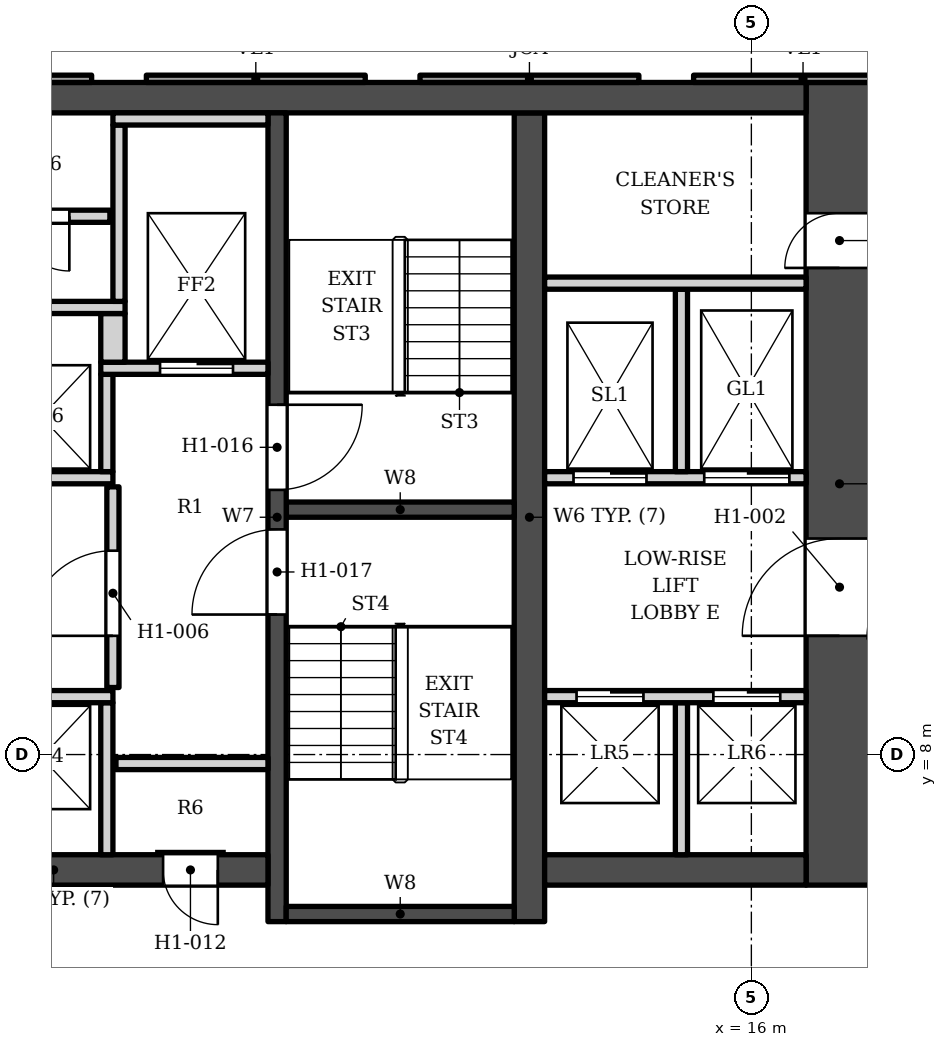
"""IFC4 building model, lengths in metres.
Left out: names, types, materials, properties, quantities, classifications, styles, units other than length and angle.
Written with IfcOpenShell. Run it as: python <this file> out.ifc"""

import sys

from ifc_helpers import new_model, si_unit, direction, frame, frame_2d, origin, place, context, subcontext, project, spatial, polyline, rectangle, outline, extrude, element, fill, save


model = new_model("IFC4")
c1 = context("Model", 3, precision=1e-05, world=origin(), true_north=direction((0.0, 1.0)))
c2 = subcontext(c1, "Body", "Model", "MODEL_VIEW")
j1 = project(units=[si_unit("LENGTHUNIT", "METRE"), si_unit("PLANEANGLEUNIT", "RADIAN")], contexts=[c1])
p1 = place(None, origin())
s1 = spatial("IfcSite", under=j1, at=p1, CompositionType="ELEMENT")
p2 = place(p1, origin())
s2 = spatial("IfcBuilding", under=s1, at=p2, CompositionType="ELEMENT")
p3 = place(p2, frame((0.0, 0.0, 46.0)))
s3 = spatial("IfcBuildingStorey", under=s2, at=p3, CompositionType="ELEMENT", Elevation=46.0)
p4 = place(p3, frame((-16.9, 18.802, 0.0), z_axis=(0.0, 0.0, 1.0), x_axis=(1.0, 0.0, 0.0)))
e1 = element("IfcWall", 1, at=p4, inside=s3, PredefinedType="SHEAR", context=c2, shape_type="SweptSolid", body=[
    extrude(rectangle(XDim=33.8, YDim=0.5, at=frame_2d((16.9, 0.0))), origin(), (0.0, 0.0, 1.0), 3.4),
])
p5 = place(p3, frame((12.35, 5.253, 0.0), z_axis=(0.0, 0.0, 1.0), x_axis=(0.0, 1.0, 0.0)))
e2 = element("IfcWall", 2, at=p5, inside=s3, PredefinedType="SHEAR", context=c2, shape_type="SweptSolid", body=[
    extrude(rectangle(XDim=13.3, YDim=0.5, at=frame_2d((6.65, 0.0))), origin(), (0.0, 0.0, 1.0), 3.4),
])
p6 = place(p3, frame((8.2, 5.253, 0.0), z_axis=(0.0, 0.0, 1.0), x_axis=(0.0, 1.0, 0.0)))
e3 = element("IfcWall", 3, at=p6, inside=s3, PredefinedType="SHEAR", context=c2, shape_type="SweptSolid", body=[
    extrude(rectangle(XDim=13.3, YDim=0.3, at=frame_2d((6.65, 0.0))), origin(), (0.0, 0.0, 1.0), 3.4),
])
p7 = place(p6, frame((7.1, 0.0, 0.0)))
e4 = element("IfcOpeningElement", 4, at=p7, cuts=e3, PredefinedType="OPENING", context=c2, shape_type="SweptSolid", body=[
    extrude(rectangle(XDim=1.4, YDim=2.1, at=frame_2d((0.7, 1.05))), frame((0.0, 0.16, 0.0), z_axis=(0.0, -1.0, 0.0), x_axis=(1.0, 0.0, 0.0)), (0.0, 0.0, 1.0), 0.32),
])
p8 = place(p6, frame((5.05, 0.0, 0.0)))
e5 = element("IfcOpeningElement", 5, at=p8, cuts=e3, PredefinedType="OPENING", context=c2, shape_type="SweptSolid", body=[
    extrude(rectangle(XDim=1.4, YDim=2.1, at=frame_2d((0.7, 1.05))), frame((0.0, 0.16, 0.0), z_axis=(0.0, -1.0, 0.0), x_axis=(1.0, 0.0, 0.0)), (0.0, 0.0, 1.0), 0.32),
])
for number, where, z_axis, x_axis in (
    (6, (8.35, 12.028, 0.0), (0.0, 0.0, 1.0), (1.0, 0.0, 0.0)),
    (7, (8.35, 5.378, 0.0), (0.0, 0.0, 1.0), (1.0, 0.0, 0.0)),
):
    element("IfcWall", number, at=place(p3, frame(where, z_axis=z_axis, x_axis=x_axis)), inside=s3, PredefinedType="SHEAR", context=c2, shape_type="SweptSolid", body=[
        extrude(rectangle(XDim=3.75, YDim=0.25, at=frame_2d((1.875, 0.0))), origin(), (0.0, 0.0, 1.0), 3.4),
    ])
p9 = place(p3, frame((1.0, 6.103, 0.0), z_axis=(0.0, 0.0, 1.0), x_axis=(1.0, 0.0, 0.0)))
e8 = element("IfcWall", 8, at=p9, inside=s3, PredefinedType="SHEAR", context=c2, shape_type="SweptSolid", body=[
    extrude(rectangle(XDim=7.05, YDim=0.5, at=frame_2d((3.525, 0.0))), origin(), (0.0, 0.0, 1.0), 3.4),
])
p10 = place(p9, frame((5.325, 0.0, 0.0)))
e9 = element("IfcOpeningElement", 9, at=p10, cuts=e8, PredefinedType="OPENING", context=c2, shape_type="SweptSolid", body=[
    extrude(rectangle(XDim=0.9, YDim=2.1, at=frame_2d((0.45, 1.05))), frame((0.0, 0.26, 0.0), z_axis=(0.0, -1.0, 0.0), x_axis=(1.0, 0.0, 0.0)), (0.0, 0.0, 1.0), 0.52),
])
p11 = place(p3, frame((12.6, 6.103, 0.0), z_axis=(0.0, 0.0, 1.0), x_axis=(1.0, 0.0, 0.0)))
e10 = element("IfcWall", 10, at=p11, inside=s3, PredefinedType="SHEAR", context=c2, shape_type="SweptSolid", body=[
    extrude(rectangle(XDim=4.3, YDim=0.5, at=frame_2d((2.15, 0.0))), origin(), (0.0, 0.0, 1.0), 3.4),
])
p12 = place(p3, frame((17.45, 5.853, 0.0), z_axis=(0.0, 0.0, 1.0), x_axis=(0.0, 1.0, 0.0)))
e11 = element("IfcWall", 11, at=p12, inside=s3, PredefinedType="SHEAR", context=c2, shape_type="SweptSolid", body=[
    extrude(rectangle(XDim=13.2, YDim=1.1, at=frame_2d((6.6, 0.0))), origin(), (0.0, 0.0, 1.0), 3.4),
])
p13 = place(p12, frame((4.1, 0.0, 0.0)))
e12 = element("IfcOpeningElement", 12, at=p13, cuts=e11, PredefinedType="OPENING", context=c2, shape_type="SweptSolid", body=[
    extrude(rectangle(XDim=1.6, YDim=2.1, at=frame_2d((0.8, 1.05))), frame((0.0, 0.56, 0.0), z_axis=(0.0, -1.0, 0.0), x_axis=(1.0, 0.0, 0.0)), (0.0, 0.0, 1.0), 1.12),
])
p14 = place(p12, frame((10.15, 0.0, 0.0)))
e13 = element("IfcOpeningElement", 13, at=p14, cuts=e11, PredefinedType="OPENING", context=c2, shape_type="SweptSolid", body=[
    extrude(rectangle(XDim=0.9, YDim=2.1, at=frame_2d((0.45, 1.05))), frame((0.0, 0.56, 0.0), z_axis=(0.0, -1.0, 0.0), x_axis=(1.0, 0.0, 0.0)), (0.0, 0.0, 1.0), 1.12),
])
p15 = place(p3, origin())
e14 = element("IfcWall", 14, at=p15, inside=s3, PredefinedType="ELEMENTEDWALL", context=c2, shape_type="SweptSolid", body=[
    extrude(outline(polyline([(15.05, 19.173), (15.05, 19.052), (18.649, 19.052), (18.649, 19.173), (15.05, 19.173)])), origin(), (0.0, 0.0, 1.0), 2.65),
])
p16 = place(p3, origin())
e15 = element("IfcWall", 15, at=p16, inside=s3, PredefinedType="SOLIDWALL", context=c2, shape_type="SweptSolid", body=[
    extrude(outline(polyline([(10.55, 19.173), (10.55, 19.052), (14.15, 19.052), (14.15, 19.173), (10.55, 19.173)])), origin(), (0.0, 0.0, 1.0), 2.65),
])
p17 = place(p3, origin())
e16 = element("IfcWall", 16, at=p17, inside=s3, PredefinedType="ELEMENTEDWALL", context=c2, shape_type="SweptSolid", body=[
    extrude(outline(polyline([(6.05, 19.173), (6.05, 19.052), (9.65, 19.052), (9.65, 19.173), (6.05, 19.173)])), origin(), (0.0, 0.0, 1.0), 2.65),
])
p18 = place(p3, origin())
e17 = element("IfcWall", 17, at=p18, inside=s3, PredefinedType="SOLIDWALL", context=c2, shape_type="SweptSolid", body=[
    extrude(outline(polyline([(1.55, 19.173), (1.55, 19.052), (5.15, 19.052), (5.15, 19.173), (1.55, 19.173)])), origin(), (0.0, 0.0, 1.0), 2.65),
])
for number, where, z_axis, x_axis in (
    (18, (5.4, 6.353, 0.0), (0.0, 0.0, 1.0), (0.0, 1.0, 0.0)),
    (19, (14.85, 6.353, 0.0), (0.0, 0.0, 1.0), (0.0, 1.0, 0.0)),
    (20, (5.55, 7.853, 0.0), (0.0, 0.0, 1.0), (1.0, 0.0, 0.0)),
):
    element("IfcWall", number, at=place(p3, frame(where, z_axis=z_axis, x_axis=x_axis)), inside=s3, PredefinedType="SOLIDWALL", context=c2, shape_type="SweptSolid", body=[
        extrude(rectangle(XDim=2.5, YDim=0.2, at=frame_2d((1.25, 0.0))), origin(), (0.0, 0.0, 1.0), 3.23),
    ])
p19 = place(p3, frame((1.0, 8.953, 0.0), z_axis=(0.0, 0.0, 1.0), x_axis=(1.0, 0.0, 0.0)))
e21 = element("IfcWall", 21, at=p19, inside=s3, PredefinedType="SOLIDWALL", context=c2, shape_type="SweptSolid", body=[
    extrude(rectangle(XDim=4.5, YDim=0.2, at=frame_2d((2.25, 0.0))), origin(), (0.0, 0.0, 1.0), 3.23),
])
p20 = place(p3, frame((12.6, 8.953, 0.0), z_axis=(0.0, 0.0, 1.0), x_axis=(1.0, 0.0, 0.0)))
e22 = element("IfcWall", 22, at=p20, inside=s3, PredefinedType="SOLIDWALL", context=c2, shape_type="SweptSolid", body=[
    extrude(rectangle(XDim=4.3, YDim=0.2, at=frame_2d((2.15, 0.0))), origin(), (0.0, 0.0, 1.0), 3.23),
])
p21 = place(p20, frame((0.525, 0.0, 0.0)))
e23 = element("IfcOpeningElement", 23, at=p21, cuts=e22, PredefinedType="OPENING", context=c2, shape_type="SweptSolid", body=[
    extrude(rectangle(XDim=1.1, YDim=2.1, at=frame_2d((0.55, 1.05))), frame((0.0, 0.11, 0.0), z_axis=(0.0, -1.0, 0.0), x_axis=(1.0, 0.0, 0.0)), (0.0, 0.0, 1.0), 0.22),
])
p22 = place(p20, frame((2.775, 0.0, 0.0)))
e24 = element("IfcOpeningElement", 24, at=p22, cuts=e22, PredefinedType="OPENING", context=c2, shape_type="SweptSolid", body=[
    extrude(rectangle(XDim=1.1, YDim=2.1, at=frame_2d((0.55, 1.05))), frame((0.0, 0.11, 0.0), z_axis=(0.0, -1.0, 0.0), x_axis=(1.0, 0.0, 0.0)), (0.0, 0.0, 1.0), 0.22),
])
p23 = place(p3, frame((5.5, 9.103, 0.0), z_axis=(0.0, 0.0, 1.0), x_axis=(0.0, 1.0, 0.0)))
e25 = element("IfcWall", 25, at=p23, inside=s3, PredefinedType="SOLIDWALL", context=c2, shape_type="SweptSolid", body=[
    extrude(rectangle(XDim=3.3, YDim=0.2, at=frame_2d((1.65, 0.0))), origin(), (0.0, 0.0, 1.0), 3.23),
])
p24 = place(p23, frame((0.85, 0.0, 0.0)))
e26 = element("IfcOpeningElement", 26, at=p24, cuts=e25, PredefinedType="OPENING", context=c2, shape_type="SweptSolid", body=[
    extrude(rectangle(XDim=1.4, YDim=2.1, at=frame_2d((0.7, 1.05))), frame((0.0, 0.11, 0.0), z_axis=(0.0, -1.0, 0.0), x_axis=(1.0, 0.0, 0.0)), (0.0, 0.0, 1.0), 0.22),
])
p25 = place(p3, frame((-1.5, 12.552, 0.0), z_axis=(0.0, 0.0, 1.0), x_axis=(1.0, 0.0, 0.0)))
e27 = element("IfcWall", 27, at=p25, inside=s3, PredefinedType="SOLIDWALL", context=c2, shape_type="SweptSolid", body=[
    extrude(rectangle(XDim=7.0, YDim=0.2, at=frame_2d((3.5, 0.0))), origin(), (0.0, 0.0, 1.0), 3.23),
])
p26 = place(p3, frame((12.6, 12.552, 0.0), z_axis=(0.0, 0.0, 1.0), x_axis=(1.0, 0.0, 0.0)))
e28 = element("IfcWall", 28, at=p26, inside=s3, PredefinedType="SOLIDWALL", context=c2, shape_type="SweptSolid", body=[
    extrude(rectangle(XDim=4.3, YDim=0.2, at=frame_2d((2.15, 0.0))), origin(), (0.0, 0.0, 1.0), 3.23),
])
p27 = place(p26, frame((0.475, 0.0, 0.0)))
e29 = element("IfcOpeningElement", 29, at=p27, cuts=e28, PredefinedType="OPENING", context=c2, shape_type="SweptSolid", body=[
    extrude(rectangle(XDim=1.2, YDim=2.1, at=frame_2d((0.6, 1.05))), frame((0.0, 0.11, 0.0), z_axis=(0.0, -1.0, 0.0), x_axis=(1.0, 0.0, 0.0)), (0.0, 0.0, 1.0), 0.22),
])
p28 = place(p26, frame((2.625, 0.0, 0.0)))
e30 = element("IfcOpeningElement", 30, at=p28, cuts=e28, PredefinedType="OPENING", context=c2, shape_type="SweptSolid", body=[
    extrude(rectangle(XDim=1.4, YDim=2.1, at=frame_2d((0.7, 1.05))), frame((0.0, 0.11, 0.0), z_axis=(0.0, -1.0, 0.0), x_axis=(1.0, 0.0, 0.0)), (0.0, 0.0, 1.0), 0.22),
])
p29 = place(p3, frame((5.4, 12.653, 0.0), z_axis=(0.0, 0.0, 1.0), x_axis=(0.0, 1.0, 0.0)))
e31 = element("IfcWall", 31, at=p29, inside=s3, PredefinedType="SOLIDWALL", context=c2, shape_type="SweptSolid", body=[
    extrude(rectangle(XDim=1.6, YDim=0.2, at=frame_2d((0.8, 0.0))), origin(), (0.0, 0.0, 1.0), 3.23),
])
p30 = place(p3, frame((14.85, 12.653, 0.0), z_axis=(0.0, 0.0, 1.0), x_axis=(0.0, 1.0, 0.0)))
e32 = element("IfcWall", 32, at=p30, inside=s3, PredefinedType="SOLIDWALL", context=c2, shape_type="SweptSolid", body=[
    extrude(rectangle(XDim=3.0, YDim=0.2, at=frame_2d((1.5, 0.0))), origin(), (0.0, 0.0, 1.0), 3.23),
])
p31 = place(p3, frame((5.3, 14.353, 0.0), z_axis=(0.0, 0.0, 1.0), x_axis=(1.0, 0.0, 0.0)))
e33 = element("IfcWall", 33, at=p31, inside=s3, PredefinedType="SOLIDWALL", context=c2, shape_type="SweptSolid", body=[
    extrude(rectangle(XDim=2.75, YDim=0.2, at=frame_2d((1.375, 0.0))), origin(), (0.0, 0.0, 1.0), 3.23),
])
p32 = place(p31, frame((0.975, 0.0, 0.0)))
e34 = element("IfcOpeningElement", 34, at=p32, cuts=e33, PredefinedType="OPENING", context=c2, shape_type="SweptSolid", body=[
    extrude(rectangle(XDim=1.2, YDim=2.1, at=frame_2d((0.6, 1.05))), frame((0.0, 0.11, 0.0), z_axis=(0.0, -1.0, 0.0), x_axis=(1.0, 0.0, 0.0)), (0.0, 0.0, 1.0), 0.22),
])
p33 = place(p3, frame((5.5, 14.453, 0.0), z_axis=(0.0, 0.0, 1.0), x_axis=(0.0, 1.0, 0.0)))
e35 = element("IfcWall", 35, at=p33, inside=s3, PredefinedType="SOLIDWALL", context=c2, shape_type="SweptSolid", body=[
    extrude(rectangle(XDim=0.8, YDim=0.4, at=frame_2d((0.4, 0.0))), origin(), (0.0, 0.0, 1.0), 3.23),
])
p34 = place(p3, frame((-1.5, 15.353, 0.0), z_axis=(0.0, 0.0, 1.0), x_axis=(1.0, 0.0, 0.0)))
e36 = element("IfcWall", 36, at=p34, inside=s3, PredefinedType="SOLIDWALL", context=c2, shape_type="SweptSolid", body=[
    extrude(rectangle(XDim=7.2, YDim=0.2, at=frame_2d((3.6, 0.0))), origin(), (0.0, 0.0, 1.0), 3.23),
])
p35 = place(p3, frame((5.6, 15.453, 0.0), z_axis=(0.0, 0.0, 1.0), x_axis=(0.0, 1.0, 0.0)))
e37 = element("IfcWall", 37, at=p35, inside=s3, PredefinedType="SOLIDWALL", context=c2, shape_type="SweptSolid", body=[
    extrude(rectangle(XDim=2.9, YDim=0.2, at=frame_2d((1.45, 0.0))), origin(), (0.0, 0.0, 1.0), 3.23),
])
p36 = place(p3, frame((12.6, 15.753, 0.0), z_axis=(0.0, 0.0, 1.0), x_axis=(1.0, 0.0, 0.0)))
e38 = element("IfcWall", 38, at=p36, inside=s3, PredefinedType="SOLIDWALL", context=c2, shape_type="SweptSolid", body=[
    extrude(rectangle(XDim=4.3, YDim=0.2, at=frame_2d((2.15, 0.0))), origin(), (0.0, 0.0, 1.0), 3.23),
])
p37 = place(p3, frame((-1.6, 16.853, 0.0), z_axis=(0.0, 0.0, 1.0), x_axis=(1.0, 0.0, 0.0)))
e39 = element("IfcWall", 39, at=p37, inside=s3, PredefinedType="SOLIDWALL", context=c2, shape_type="SweptSolid", body=[
    extrude(rectangle(XDim=7.05, YDim=0.2, at=frame_2d((3.525, 0.0))), origin(), (0.0, 0.0, 1.0), 3.23),
])
p38 = place(p37, frame((0.817, 0.0, 0.0)))
e40 = element("IfcOpeningElement", 40, at=p38, cuts=e39, PredefinedType="OPENING", context=c2, shape_type="SweptSolid", body=[
    extrude(rectangle(XDim=0.9, YDim=2.1, at=frame_2d((0.45, 1.05))), frame((0.0, 0.11, 0.0), z_axis=(0.0, -1.0, 0.0), x_axis=(1.0, 0.0, 0.0)), (0.0, 0.0, 1.0), 0.22),
])
p39 = place(p37, frame((3.15, 0.0, 0.0)))
e41 = element("IfcOpeningElement", 41, at=p39, cuts=e39, PredefinedType="OPENING", context=c2, shape_type="SweptSolid", body=[
    extrude(rectangle(XDim=0.9, YDim=2.1, at=frame_2d((0.45, 1.05))), frame((0.0, 0.11, 0.0), z_axis=(0.0, -1.0, 0.0), x_axis=(1.0, 0.0, 0.0)), (0.0, 0.0, 1.0), 0.22),
])
p40 = place(p37, frame((5.483, 0.0, 0.0)))
e42 = element("IfcOpeningElement", 42, at=p40, cuts=e39, PredefinedType="OPENING", context=c2, shape_type="SweptSolid", body=[
    extrude(rectangle(XDim=0.9, YDim=2.1, at=frame_2d((0.45, 1.05))), frame((0.0, 0.11, 0.0), z_axis=(0.0, -1.0, 0.0), x_axis=(1.0, 0.0, 0.0)), (0.0, 0.0, 1.0), 0.22),
])
p41 = place(p3, frame((5.5, 18.453, 0.0), z_axis=(0.0, 0.0, 1.0), x_axis=(1.0, 0.0, 0.0)))
e43 = element("IfcWall", 43, at=p41, inside=s3, PredefinedType="SOLIDWALL", context=c2, shape_type="SweptSolid", body=[
    extrude(rectangle(XDim=2.55, YDim=0.2, at=frame_2d((1.275, 0.0))), origin(), (0.0, 0.0, 1.0), 3.23),
])
p42 = place(p32, origin())
e44 = element("IfcDoor", 44, at=p42, inside=s3, OperationType="DOUBLE_DOOR_SLIDING", PredefinedType="DOOR", context=c2, shape_type="SweptSolid", body=[
    extrude(rectangle(XDim=1.2, YDim=2.1, at=frame_2d((0.6, 1.05))), frame((0.0, 0.025, 0.0), z_axis=(0.0, -1.0, 0.0), x_axis=(1.0, 0.0, 0.0)), (0.0, 0.0, 1.0), 0.05),
])
fill(e34, e44)
p43 = place(p21, origin())
e45 = element("IfcDoor", 45, at=p43, inside=s3, OperationType="DOUBLE_DOOR_SLIDING", PredefinedType="DOOR", context=c2, shape_type="SweptSolid", body=[
    extrude(rectangle(XDim=1.1, YDim=2.1, at=frame_2d((0.55, 1.05))), frame((0.0, 0.025, 0.0), z_axis=(0.0, -1.0, 0.0), x_axis=(1.0, 0.0, 0.0)), (0.0, 0.0, 1.0), 0.05),
])
fill(e23, e45)
p44 = place(p22, origin())
e46 = element("IfcDoor", 46, at=p44, inside=s3, OperationType="DOUBLE_DOOR_SLIDING", PredefinedType="DOOR", context=c2, shape_type="SweptSolid", body=[
    extrude(rectangle(XDim=1.1, YDim=2.1, at=frame_2d((0.55, 1.05))), frame((0.0, 0.025, 0.0), z_axis=(0.0, -1.0, 0.0), x_axis=(1.0, 0.0, 0.0)), (0.0, 0.0, 1.0), 0.05),
])
fill(e24, e46)
p45 = place(p27, origin())
e47 = element("IfcDoor", 47, at=p45, inside=s3, OperationType="DOUBLE_DOOR_SLIDING", PredefinedType="DOOR", context=c2, shape_type="SweptSolid", body=[
    extrude(rectangle(XDim=1.2, YDim=2.1, at=frame_2d((0.6, 1.05))), frame((0.0, 0.025, 0.0), z_axis=(0.0, -1.0, 0.0), x_axis=(1.0, 0.0, 0.0)), (0.0, 0.0, 1.0), 0.05),
])
fill(e29, e47)
p46 = place(p28, origin())
e48 = element("IfcDoor", 48, at=p46, inside=s3, OperationType="DOUBLE_DOOR_SLIDING", PredefinedType="DOOR", context=c2, shape_type="SweptSolid", body=[
    extrude(rectangle(XDim=1.4, YDim=2.1, at=frame_2d((0.7, 1.05))), frame((0.0, 0.025, 0.0), z_axis=(0.0, -1.0, 0.0), x_axis=(1.0, 0.0, 0.0)), (0.0, 0.0, 1.0), 0.05),
])
fill(e30, e48)
p47 = place(p7, origin())
e49 = element("IfcDoor", 49, at=p47, inside=s3, OperationType="SINGLE_SWING_RIGHT", PredefinedType="DOOR", context=c2, shape_type="SweptSolid", body=[
    extrude(rectangle(XDim=1.4, YDim=2.1, at=frame_2d((0.7, 1.05))), frame((0.0, 0.025, 0.0), z_axis=(0.0, -1.0, 0.0), x_axis=(1.0, 0.0, 0.0)), (0.0, 0.0, 1.0), 0.05),
])
fill(e4, e49)
p48 = place(p8, origin())
e50 = element("IfcDoor", 50, at=p48, inside=s3, OperationType="SINGLE_SWING_LEFT", PredefinedType="DOOR", context=c2, shape_type="SweptSolid", body=[
    extrude(rectangle(XDim=1.4, YDim=2.1, at=frame_2d((0.7, 1.05))), frame((0.0, 0.025, 0.0), z_axis=(0.0, -1.0, 0.0), x_axis=(1.0, 0.0, 0.0)), (0.0, 0.0, 1.0), 0.05),
])
fill(e5, e50)
p49 = place(p24, origin())
e51 = element("IfcDoor", 51, at=p49, inside=s3, OperationType="SINGLE_SWING_LEFT", PredefinedType="DOOR", context=c2, shape_type="SweptSolid", body=[
    extrude(rectangle(XDim=1.4, YDim=2.1, at=frame_2d((0.7, 1.05))), frame((0.0, 0.025, 0.0), z_axis=(0.0, -1.0, 0.0), x_axis=(1.0, 0.0, 0.0)), (0.0, 0.0, 1.0), 0.05),
])
fill(e26, e51)
p50 = place(p40, origin())
e52 = element("IfcDoor", 52, at=p50, inside=s3, OperationType="SINGLE_SWING_RIGHT", PredefinedType="DOOR", context=c2, shape_type="SweptSolid", body=[
    extrude(rectangle(XDim=0.9, YDim=2.1, at=frame_2d((0.45, 1.05))), frame((0.0, 0.025, 0.0), z_axis=(0.0, -1.0, 0.0), x_axis=(1.0, 0.0, 0.0)), (0.0, 0.0, 1.0), 0.05),
])
fill(e42, e52)
p51 = place(p10, origin())
e53 = element("IfcDoor", 53, at=p51, inside=s3, OperationType="SINGLE_SWING_RIGHT", PredefinedType="DOOR", context=c2, shape_type="SweptSolid", body=[
    extrude(rectangle(XDim=0.9, YDim=2.1, at=frame_2d((0.45, 1.05))), frame((0.0, 0.025, 0.0), z_axis=(0.0, -1.0, 0.0), x_axis=(1.0, 0.0, 0.0)), (0.0, 0.0, 1.0), 0.05),
])
fill(e9, e53)
p52 = place(p13, origin())
e54 = element("IfcDoor", 54, at=p52, inside=s3, OperationType="DOUBLE_DOOR_SINGLE_SWING", PredefinedType="DOOR", context=c2, shape_type="SweptSolid", body=[
    extrude(rectangle(XDim=1.6, YDim=2.1, at=frame_2d((0.8, 1.05))), frame((0.0, 0.275, 0.0), z_axis=(0.0, -1.0, 0.0), x_axis=(1.0, 0.0, 0.0)), (0.0, 0.0, 1.0), 0.05),
])
fill(e12, e54)
p53 = place(p14, origin())
e55 = element("IfcDoor", 55, at=p53, inside=s3, OperationType="SINGLE_SWING_LEFT", PredefinedType="DOOR", context=c2, shape_type="SweptSolid", body=[
    extrude(rectangle(XDim=0.9, YDim=2.1, at=frame_2d((0.45, 1.05))), frame((0.0, 0.275, 0.0), z_axis=(0.0, -1.0, 0.0), x_axis=(1.0, 0.0, 0.0)), (0.0, 0.0, 1.0), 0.05),
])
fill(e13, e55)
save(model, sys.argv[1])
